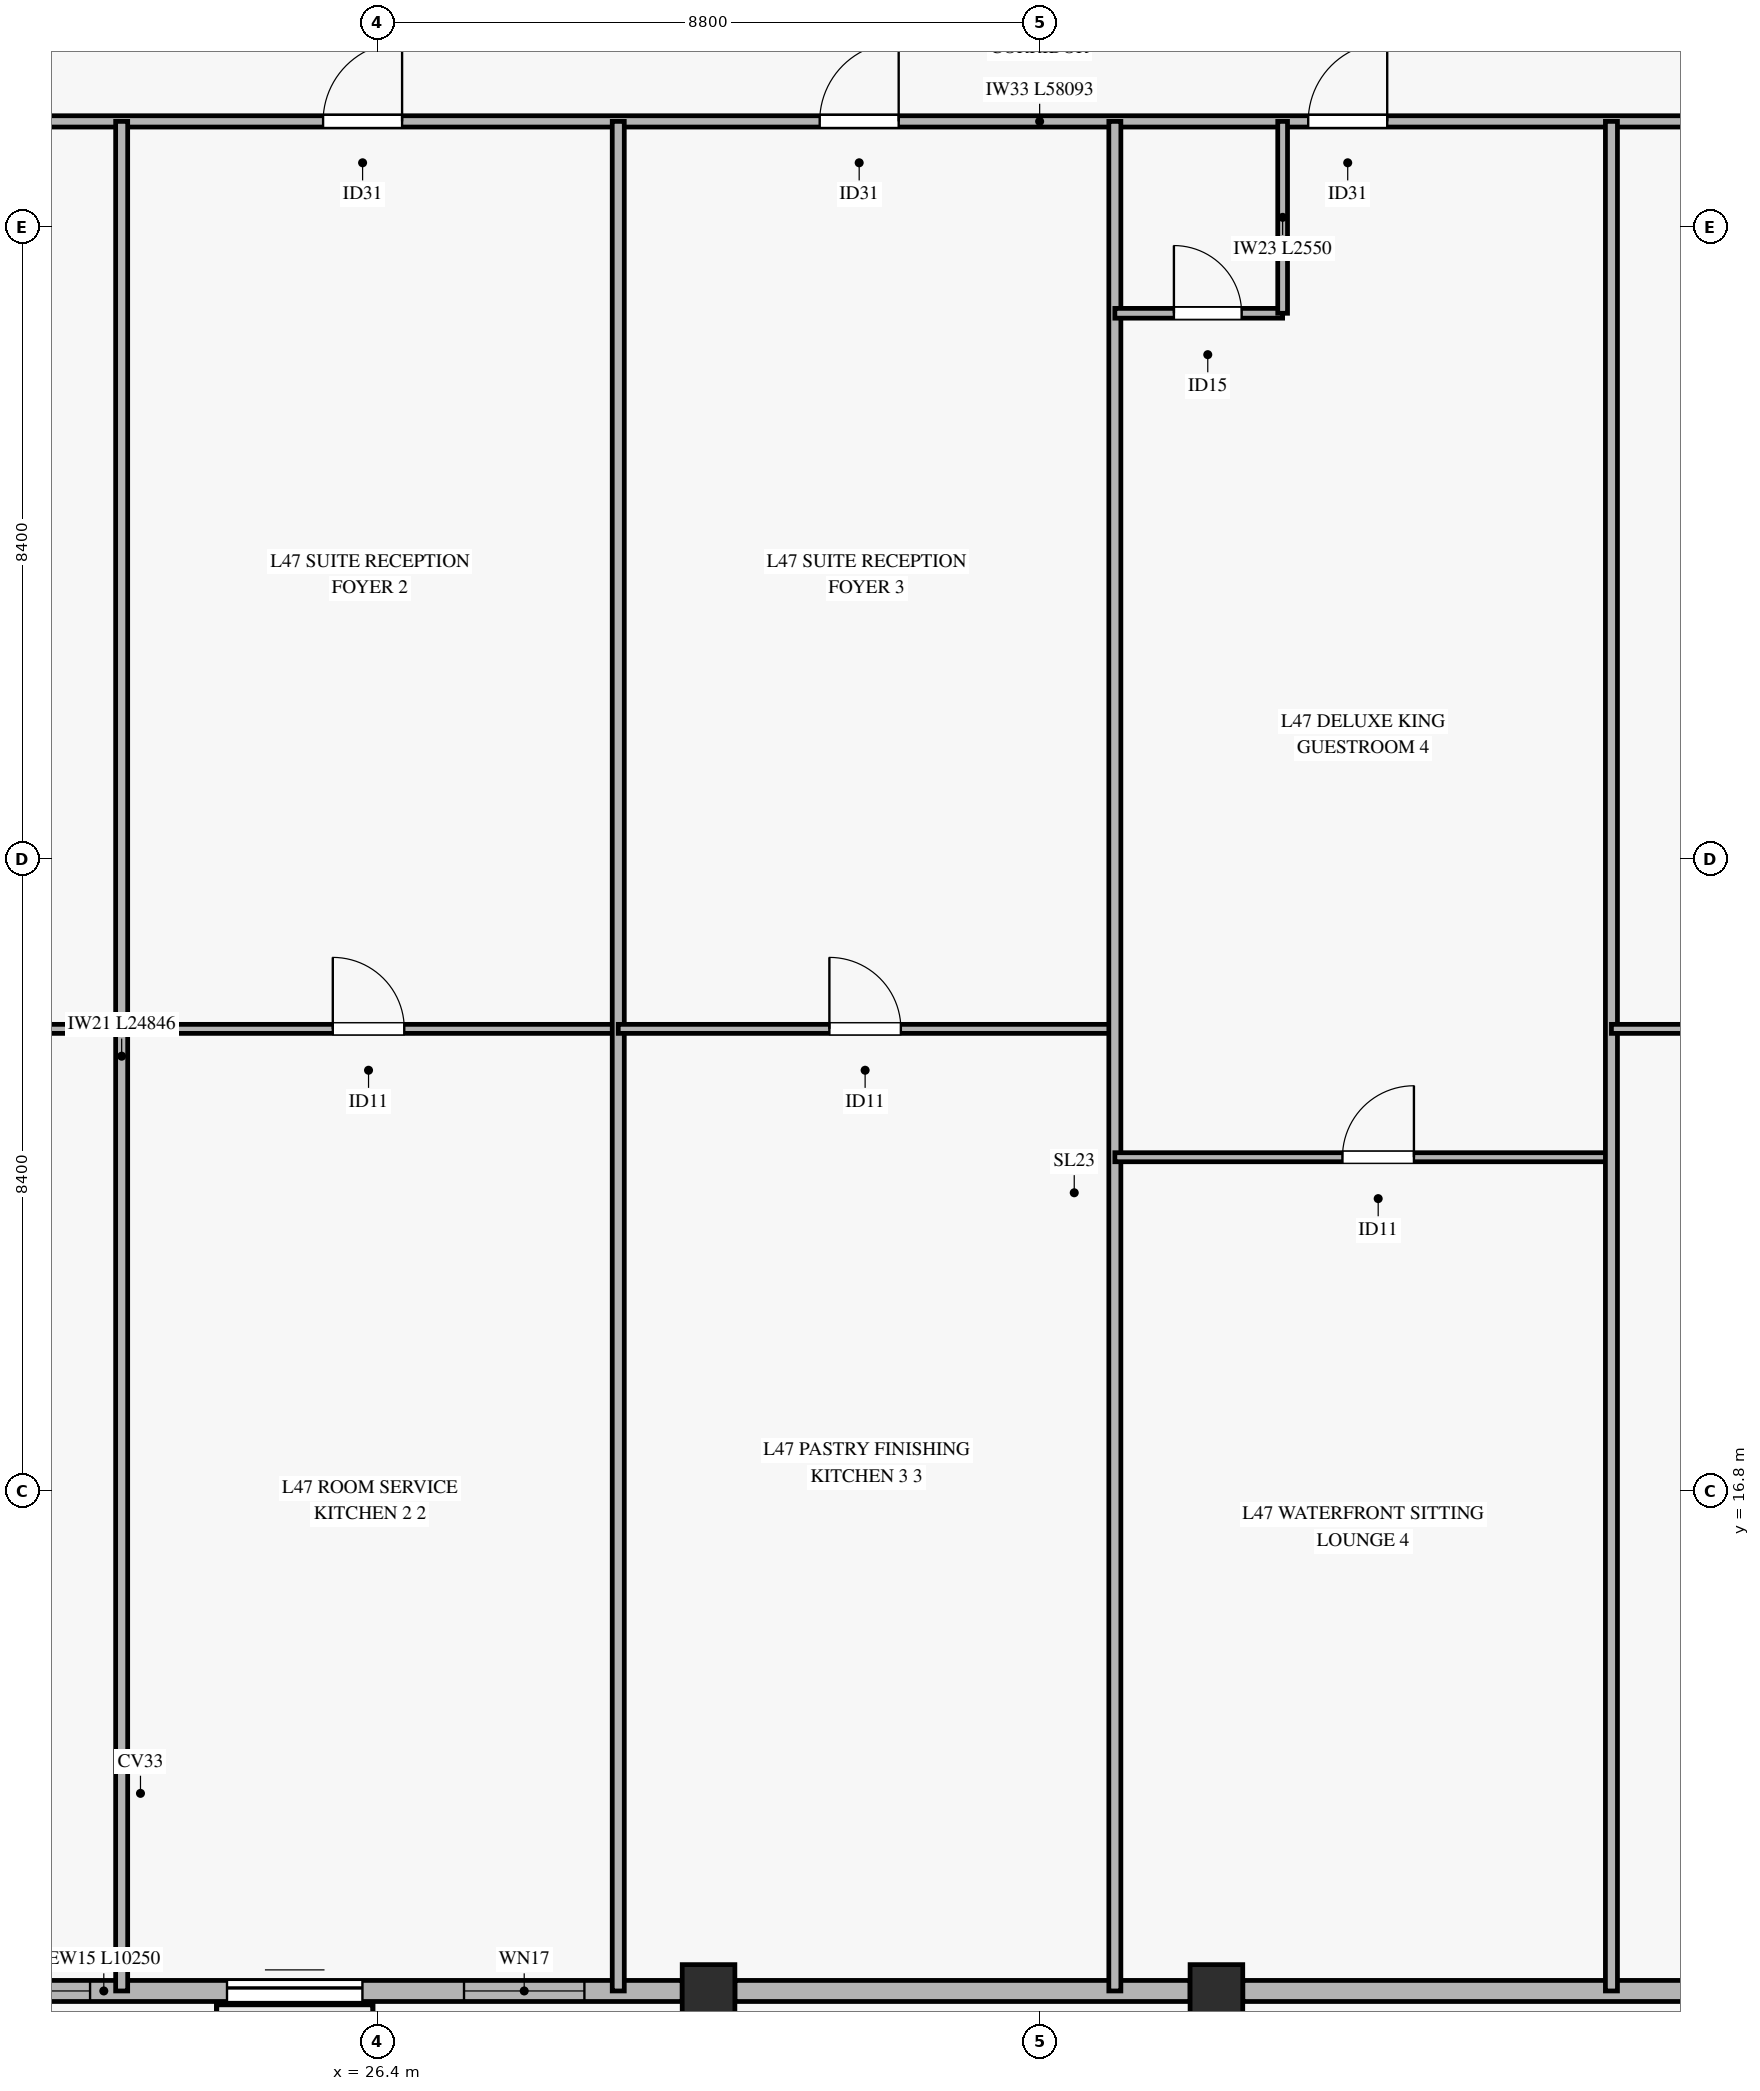
"""IFC4 building model, lengths in metres.
Left out: names, types, materials, properties, quantities, classifications, styles, units other than length and angle.
Written with IfcOpenShell. Run it as: python <this file> out.ifc"""

import sys

from ifc_helpers import new_model, si_unit, direction, frame, frame_2d, origin, origin_2d, place, context, subcontext, project, spatial, rectangle, hollow_rectangle, extrude, source, transform, mapped, element, fill, save


model = new_model("IFC4")
c1 = context("Model", 3, precision=1e-05, world=origin(), true_north=direction((0.0, 1.0)))
c2 = subcontext(c1, "Body", "Model", "MODEL_VIEW")
j1 = project(units=[si_unit("LENGTHUNIT", "METRE"), si_unit("PLANEANGLEUNIT", "RADIAN")], contexts=[c1])
p1 = place(None, origin())
s1 = spatial("IfcSite", under=j1, at=p1, CompositionType="ELEMENT")
p2 = place(p1, origin())
s2 = spatial("IfcBuilding", under=s1, at=p2, CompositionType="ELEMENT")
p3 = place(p2, frame((0.0, 0.0, 187.7)))
s3 = spatial("IfcBuildingStorey", under=s2, at=p3, CompositionType="ELEMENT", Elevation=187.7)
m1 = source(origin(), c2, "Body", "SweptSolid", [
    extrude(hollow_rectangle(XDim=0.7, YDim=0.7, WallThickness=0.032, at=origin_2d()), origin(), (0.0, 0.0, 1.0), 3.263),
])
for number, where, z_axis, x_axis in (
    (1, (30.8, 10.154, 0.0), (0.0, 0.161, 0.987), (-1.0, 0.0, 0.0)),
    (2, (37.55, 10.154, 0.0), (0.0, 0.161, 0.987), (-1.0, 0.0, 0.0)),
):
    element("IfcColumn", number, at=place(p3, frame(where, z_axis=z_axis, x_axis=x_axis)), inside=s3, PredefinedType="COLUMN", context=c2, shape_type="MappedRepresentation", body=[
        mapped(m1, transform((0.0, 0.0, 0.0), x_axis=(1.0, 0.0, 0.0), y_axis=(0.0, 1.0, 0.0), z_axis=(0.0, 0.0, 1.0), scale=1.0)),
    ])
p4 = place(p3, frame((20.2, 10.154, 0.0), z_axis=(0.0, 0.0, 1.0), x_axis=(1.0, 0.0, 0.0)))
e3 = element("IfcWall", 3, at=p4, inside=s3, PredefinedType="SOLIDWALL", context=c2, shape_type="SweptSolid", body=[
    extrude(rectangle(XDim=10.25, YDim=0.28, at=frame_2d((5.125, 0.0))), origin(), (0.0, 0.0, 1.0), 2.7),
])
p5 = place(p4, frame((4.2, 0.0, 0.0)))
e4 = element("IfcOpeningElement", 4, at=p5, cuts=e3, PredefinedType="OPENING", context=c2, shape_type="SweptSolid", body=[
    extrude(rectangle(XDim=1.8, YDim=2.25, at=frame_2d((0.9, 1.125))), frame((0.0, 0.15, 0.0), z_axis=(0.0, -1.0, 0.0), x_axis=(1.0, 0.0, 0.0)), (0.0, 0.0, 1.0), 0.3),
])
p6 = place(p4, frame((0.38, 0.0, 0.35)))
e5 = element("IfcOpeningElement", 5, at=p6, cuts=e3, PredefinedType="OPENING", context=c2, shape_type="SweptSolid", body=[
    extrude(rectangle(XDim=2.0, YDim=2.0, at=frame_2d((1.0, 1.0))), frame((0.0, 0.15, 0.0), z_axis=(0.0, -1.0, 0.0), x_axis=(1.0, 0.0, 0.0)), (0.0, 0.0, 1.0), 0.3),
])
p7 = place(p4, frame((7.35, 0.0, 0.35)))
e6 = element("IfcOpeningElement", 6, at=p7, cuts=e3, PredefinedType="OPENING", context=c2, shape_type="SweptSolid", body=[
    extrude(rectangle(XDim=1.6, YDim=2.0, at=frame_2d((0.8, 1.0))), frame((0.0, 0.15, 0.0), z_axis=(0.0, -1.0, 0.0), x_axis=(1.0, 0.0, 0.0)), (0.0, 0.0, 1.0), 0.3),
])
for number, where, z_axis, x_axis in (
    (7, (31.15, 10.154, 0.0), (0.0, 0.0, 1.0), (1.0, 0.0, 0.0)),
    (8, (37.9, 10.154, 0.0), (0.0, 0.0, 1.0), (1.0, 0.0, 0.0)),
):
    element("IfcWall", number, at=place(p3, frame(where, z_axis=z_axis, x_axis=x_axis)), inside=s3, PredefinedType="SOLIDWALL", context=c2, shape_type="SweptSolid", body=[
        extrude(rectangle(XDim=6.05, YDim=0.28, at=frame_2d((3.025, 0.0))), origin(), (0.0, 0.0, 1.0), 2.7),
    ])
p8 = place(p3, frame((6.154, 35.0, 0.0), z_axis=(0.0, 0.0, 1.0), x_axis=(1.0, 0.0, 0.0)))
e9 = element("IfcWall", 9, at=p8, inside=s3, PredefinedType="PARTITIONING", context=c2, shape_type="SweptSolid", body=[
    extrude(rectangle(XDim=58.093, YDim=0.15, at=frame_2d((29.046, 0.0))), origin(), (0.0, 0.0, 1.0), 2.405),
])
p9 = place(p8, frame((6.84, 0.0, 0.0)))
e10 = element("IfcOpeningElement", 10, at=p9, cuts=e9, PredefinedType="OPENING", context=c2, shape_type="SweptSolid", body=[
    extrude(rectangle(XDim=1.05, YDim=2.15, at=frame_2d((0.525, 1.075))), frame((0.0, 0.085, 0.0), z_axis=(0.0, -1.0, 0.0), x_axis=(1.0, 0.0, 0.0)), (0.0, 0.0, 1.0), 0.17),
])
p10 = place(p8, frame((19.523, 0.0, 0.0)))
e11 = element("IfcOpeningElement", 11, at=p10, cuts=e9, PredefinedType="OPENING", context=c2, shape_type="SweptSolid", body=[
    extrude(rectangle(XDim=1.05, YDim=2.15, at=frame_2d((0.525, 1.075))), frame((0.0, 0.085, 0.0), z_axis=(0.0, -1.0, 0.0), x_axis=(1.0, 0.0, 0.0)), (0.0, 0.0, 1.0), 0.17),
])
p11 = place(p8, frame((26.123, 0.0, 0.0)))
e12 = element("IfcOpeningElement", 12, at=p11, cuts=e9, PredefinedType="OPENING", context=c2, shape_type="SweptSolid", body=[
    extrude(rectangle(XDim=1.05, YDim=2.15, at=frame_2d((0.525, 1.075))), frame((0.0, 0.085, 0.0), z_axis=(0.0, -1.0, 0.0), x_axis=(1.0, 0.0, 0.0)), (0.0, 0.0, 1.0), 0.17),
])
p12 = place(p8, frame((32.616, 0.0, 0.0)))
e13 = element("IfcOpeningElement", 13, at=p12, cuts=e9, PredefinedType="OPENING", context=c2, shape_type="SweptSolid", body=[
    extrude(rectangle(XDim=1.05, YDim=2.15, at=frame_2d((0.525, 1.075))), frame((0.0, 0.085, 0.0), z_axis=(0.0, -1.0, 0.0), x_axis=(1.0, 0.0, 0.0)), (0.0, 0.0, 1.0), 0.17),
])
p13 = place(p8, frame((44.8, 0.0, 0.0)))
e14 = element("IfcOpeningElement", 14, at=p13, cuts=e9, PredefinedType="OPENING", context=c2, shape_type="SweptSolid", body=[
    extrude(rectangle(XDim=1.05, YDim=2.15, at=frame_2d((0.525, 1.075))), frame((0.0, 0.085, 0.0), z_axis=(0.0, -1.0, 0.0), x_axis=(1.0, 0.0, 0.0)), (0.0, 0.0, 1.0), 0.17),
])
p14 = place(p3, frame((6.154, 22.94, 0.0), z_axis=(0.0, 0.0, 1.0), x_axis=(1.0, 0.0, 0.0)))
e15 = element("IfcWall", 15, at=p14, inside=s3, PredefinedType="PARTITIONING", context=c2, shape_type="SweptSolid", body=[
    extrude(rectangle(XDim=16.846, YDim=0.12, at=frame_2d((8.423, 0.0))), origin(), (0.0, 0.0, 1.0), 2.405),
])
p15 = place(p14, frame((7.165, 0.0, 0.0)))
e16 = element("IfcOpeningElement", 16, at=p15, cuts=e15, PredefinedType="OPENING", context=c2, shape_type="SweptSolid", body=[
    extrude(rectangle(XDim=0.95, YDim=2.1, at=frame_2d((0.475, 1.05))), frame((0.0, 0.07, 0.0), z_axis=(0.0, -1.0, 0.0), x_axis=(1.0, 0.0, 0.0)), (0.0, 0.0, 1.0), 0.14),
])
p16 = place(p3, frame((23.0, 10.154, 0.0), z_axis=(0.0, 0.0, 1.0), x_axis=(0.0, 1.0, 0.0)))
e17 = element("IfcWall", 17, at=p16, inside=s3, PredefinedType="PARTITIONING", context=c2, shape_type="SweptSolid", body=[
    extrude(rectangle(XDim=24.846, YDim=0.16, at=frame_2d((12.423, 0.0))), origin(), (0.0, 0.0, 1.0), 2.705),
])
p17 = place(p3, frame((23.0, 22.94, 0.0), z_axis=(0.0, 0.0, 1.0), x_axis=(1.0, 0.0, 0.0)))
e18 = element("IfcWall", 18, at=p17, inside=s3, PredefinedType="PARTITIONING", context=c2, shape_type="SweptSolid", body=[
    extrude(rectangle(XDim=6.6, YDim=0.12, at=frame_2d((3.3, 0.0))), origin(), (0.0, 0.0, 1.0), 3.22),
])
p18 = place(p17, frame((2.806, 0.0, 0.0)))
e19 = element("IfcOpeningElement", 19, at=p18, cuts=e18, PredefinedType="OPENING", context=c2, shape_type="SweptSolid", body=[
    extrude(rectangle(XDim=0.95, YDim=2.1, at=frame_2d((0.475, 1.05))), frame((0.0, 0.07, 0.0), z_axis=(0.0, -1.0, 0.0), x_axis=(1.0, 0.0, 0.0)), (0.0, 0.0, 1.0), 0.14),
])
p19 = place(p3, frame((29.6, 10.154, 0.0), z_axis=(0.0, 0.0, 1.0), x_axis=(0.0, 1.0, 0.0)))
e20 = element("IfcWall", 20, at=p19, inside=s3, PredefinedType="PARTITIONING", context=c2, shape_type="SweptSolid", body=[
    extrude(rectangle(XDim=24.846, YDim=0.16, at=frame_2d((12.423, 0.0))), origin(), (0.0, 0.0, 1.0), 2.705),
])
p20 = place(p3, frame((29.6, 22.94, 0.0), z_axis=(0.0, 0.0, 1.0), x_axis=(1.0, 0.0, 0.0)))
e21 = element("IfcWall", 21, at=p20, inside=s3, PredefinedType="PARTITIONING", context=c2, shape_type="SweptSolid", body=[
    extrude(rectangle(XDim=6.6, YDim=0.12, at=frame_2d((3.3, 0.0))), origin(), (0.0, 0.0, 1.0), 2.405),
])
p21 = place(p20, frame((2.806, 0.0, 0.0)))
e22 = element("IfcOpeningElement", 22, at=p21, cuts=e21, PredefinedType="OPENING", context=c2, shape_type="SweptSolid", body=[
    extrude(rectangle(XDim=0.95, YDim=2.1, at=frame_2d((0.475, 1.05))), frame((0.0, 0.07, 0.0), z_axis=(0.0, -1.0, 0.0), x_axis=(1.0, 0.0, 0.0)), (0.0, 0.0, 1.0), 0.14),
])
p22 = place(p3, frame((36.2, 10.154, 0.0), z_axis=(0.0, 0.0, 1.0), x_axis=(0.0, 1.0, 0.0)))
e23 = element("IfcWall", 23, at=p22, inside=s3, PredefinedType="PARTITIONING", context=c2, shape_type="SweptSolid", body=[
    extrude(rectangle(XDim=24.846, YDim=0.16, at=frame_2d((12.423, 0.0))), origin(), (0.0, 0.0, 1.0), 2.705),
])
p23 = place(p3, frame((36.2, 32.45, 0.0), z_axis=(0.0, 0.0, 1.0), x_axis=(1.0, 0.0, 0.0)))
e24 = element("IfcWall", 24, at=p23, inside=s3, PredefinedType="PARTITIONING", context=c2, shape_type="SweptSolid", body=[
    extrude(rectangle(XDim=2.23, YDim=0.13, at=frame_2d((1.115, 0.0))), origin(), (0.0, 0.0, 1.0), 2.405),
])
p24 = place(p23, frame((0.785, 0.0, 0.0)))
e25 = element("IfcOpeningElement", 25, at=p24, cuts=e24, PredefinedType="OPENING", context=c2, shape_type="SweptSolid", body=[
    extrude(rectangle(XDim=0.9, YDim=2.1, at=frame_2d((0.45, 1.05))), frame((0.0, 0.075, 0.0), z_axis=(0.0, -1.0, 0.0), x_axis=(1.0, 0.0, 0.0)), (0.0, 0.0, 1.0), 0.15),
])
p25 = place(p3, frame((38.43, 32.45, 0.0), z_axis=(0.0, 0.0, 1.0), x_axis=(0.0, 1.0, 0.0)))
e26 = element("IfcWall", 26, at=p25, inside=s3, PredefinedType="PARTITIONING", context=c2, shape_type="SweptSolid", body=[
    extrude(rectangle(XDim=2.55, YDim=0.13, at=frame_2d((1.275, 0.0))), origin(), (0.0, 0.0, 1.0), 2.755),
])
p26 = place(p3, frame((36.2, 21.234, 0.0), z_axis=(0.0, 0.0, 1.0), x_axis=(1.0, 0.0, 0.0)))
e27 = element("IfcWall", 27, at=p26, inside=s3, PredefinedType="PARTITIONING", context=c2, shape_type="SweptSolid", body=[
    extrude(rectangle(XDim=6.6, YDim=0.12, at=frame_2d((3.3, 0.0))), origin(), (0.0, 0.0, 1.0), 2.405),
])
p27 = place(p26, frame((3.025, 0.0, 0.0)))
e28 = element("IfcOpeningElement", 28, at=p27, cuts=e27, PredefinedType="OPENING", context=c2, shape_type="SweptSolid", body=[
    extrude(rectangle(XDim=0.95, YDim=2.1, at=frame_2d((0.475, 1.05))), frame((0.0, 0.07, 0.0), z_axis=(0.0, -1.0, 0.0), x_axis=(1.0, 0.0, 0.0)), (0.0, 0.0, 1.0), 0.14),
])
p28 = place(p3, frame((42.8, 10.154, 0.0), z_axis=(0.0, 0.0, 1.0), x_axis=(0.0, 1.0, 0.0)))
e29 = element("IfcWall", 29, at=p28, inside=s3, PredefinedType="PARTITIONING", context=c2, shape_type="SweptSolid", body=[
    extrude(rectangle(XDim=24.846, YDim=0.16, at=frame_2d((12.423, 0.0))), origin(), (0.0, 0.0, 1.0), 2.705),
])
p29 = place(p3, frame((42.8, 22.94, 0.0), z_axis=(0.0, 0.0, 1.0), x_axis=(1.0, 0.0, 0.0)))
e30 = element("IfcWall", 30, at=p29, inside=s3, PredefinedType="PARTITIONING", context=c2, shape_type="SweptSolid", body=[
    extrude(rectangle(XDim=21.447, YDim=0.12, at=frame_2d((10.724, 0.0))), origin(), (0.0, 0.0, 1.0), 2.405),
])
p30 = place(p29, frame((8.571, 0.0, 0.0)))
e31 = element("IfcOpeningElement", 31, at=p30, cuts=e30, PredefinedType="OPENING", context=c2, shape_type="SweptSolid", body=[
    extrude(rectangle(XDim=0.95, YDim=2.1, at=frame_2d((0.475, 1.05))), frame((0.0, 0.07, 0.0), z_axis=(0.0, -1.0, 0.0), x_axis=(1.0, 0.0, 0.0)), (0.0, 0.0, 1.0), 0.14),
])
m2 = source(origin(), c2, "Body", "SweptSolid", [
    extrude(rectangle(XDim=1.8, YDim=2.25, at=frame_2d((0.9, 1.125))), frame((0.0, 0.025, 0.0), z_axis=(0.0, -1.0, 0.0), x_axis=(1.0, 0.0, 0.0)), (0.0, 0.0, 1.0), 0.05),
])
p31 = place(p5, origin())
e32 = element("IfcDoor", 32, at=p31, inside=s3, OperationType="SLIDING_TO_LEFT", PredefinedType="DOOR", context=c2, shape_type="MappedRepresentation", body=[
    mapped(m2, transform((0.0, 0.0, 0.0), x_axis=(1.0, 0.0, 0.0), y_axis=(0.0, 1.0, 0.0), z_axis=(0.0, 0.0, 1.0), scale=1.0)),
])
fill(e4, e32)
m3 = source(origin(), c2, "Body", "SweptSolid", [
    extrude(rectangle(XDim=2.0, YDim=2.0, at=frame_2d((1.0, 1.0))), frame((0.0, 0.03, 0.0), z_axis=(0.0, -1.0, 0.0), x_axis=(1.0, 0.0, 0.0)), (0.0, 0.0, 1.0), 0.06),
])
p32 = place(p6, origin())
e33 = element("IfcWindow", 33, at=p32, inside=s3, PartitioningType="SINGLE_PANEL", PredefinedType="WINDOW", context=c2, shape_type="MappedRepresentation", body=[
    mapped(m3, transform((0.0, 0.0, 0.0), x_axis=(1.0, 0.0, 0.0), y_axis=(0.0, 1.0, 0.0), z_axis=(0.0, 0.0, 1.0), scale=1.0)),
])
fill(e5, e33)
m4 = source(origin(), c2, "Body", "SweptSolid", [
    extrude(rectangle(XDim=1.6, YDim=2.0, at=frame_2d((0.8, 1.0))), frame((0.0, 0.03, 0.0), z_axis=(0.0, -1.0, 0.0), x_axis=(1.0, 0.0, 0.0)), (0.0, 0.0, 1.0), 0.06),
])
p33 = place(p7, origin())
e34 = element("IfcWindow", 34, at=p33, inside=s3, PartitioningType="SINGLE_PANEL", PredefinedType="WINDOW", context=c2, shape_type="MappedRepresentation", body=[
    mapped(m4, transform((0.0, 0.0, 0.0), x_axis=(1.0, 0.0, 0.0), y_axis=(0.0, 1.0, 0.0), z_axis=(0.0, 0.0, 1.0), scale=1.0)),
])
fill(e6, e34)
m5 = source(origin(), c2, "Body", "SweptSolid", [
    extrude(rectangle(XDim=1.05, YDim=2.15, at=frame_2d((0.525, 1.075))), frame((0.0, 0.025, 0.0), z_axis=(0.0, -1.0, 0.0), x_axis=(1.0, 0.0, 0.0)), (0.0, 0.0, 1.0), 0.05),
])
p34 = place(p10, origin())
e35 = element("IfcDoor", 35, at=p34, inside=s3, OperationType="SINGLE_SWING_RIGHT", PredefinedType="DOOR", context=c2, shape_type="MappedRepresentation", body=[
    mapped(m5, transform((0.0, 0.0, 0.0), x_axis=(1.0, 0.0, 0.0), y_axis=(0.0, 1.0, 0.0), z_axis=(0.0, 0.0, 1.0), scale=1.0)),
])
fill(e11, e35)
m6 = source(origin(), c2, "Body", "SweptSolid", [
    extrude(rectangle(XDim=0.95, YDim=2.1, at=frame_2d((0.475, 1.05))), frame((0.0, 0.025, 0.0), z_axis=(0.0, -1.0, 0.0), x_axis=(1.0, 0.0, 0.0)), (0.0, 0.0, 1.0), 0.05),
])
p35 = place(p18, origin())
e36 = element("IfcDoor", 36, at=p35, inside=s3, OperationType="SINGLE_SWING_LEFT", PredefinedType="DOOR", context=c2, shape_type="MappedRepresentation", body=[
    mapped(m6, transform((0.0, 0.0, 0.0), x_axis=(1.0, 0.0, 0.0), y_axis=(0.0, 1.0, 0.0), z_axis=(0.0, 0.0, 1.0), scale=1.0)),
])
fill(e19, e36)
p36 = place(p11, origin())
e37 = element("IfcDoor", 37, at=p36, inside=s3, OperationType="SINGLE_SWING_RIGHT", PredefinedType="DOOR", context=c2, shape_type="MappedRepresentation", body=[
    mapped(m5, transform((0.0, 0.0, 0.0), x_axis=(1.0, 0.0, 0.0), y_axis=(0.0, 1.0, 0.0), z_axis=(0.0, 0.0, 1.0), scale=1.0)),
])
fill(e12, e37)
p37 = place(p21, origin())
e38 = element("IfcDoor", 38, at=p37, inside=s3, OperationType="SINGLE_SWING_LEFT", PredefinedType="DOOR", context=c2, shape_type="MappedRepresentation", body=[
    mapped(m6, transform((0.0, 0.0, 0.0), x_axis=(1.0, 0.0, 0.0), y_axis=(0.0, 1.0, 0.0), z_axis=(0.0, 0.0, 1.0), scale=1.0)),
])
fill(e22, e38)
p38 = place(p12, origin())
e39 = element("IfcDoor", 39, at=p38, inside=s3, OperationType="SINGLE_SWING_RIGHT", PredefinedType="DOOR", context=c2, shape_type="MappedRepresentation", body=[
    mapped(m5, transform((0.0, 0.0, 0.0), x_axis=(1.0, 0.0, 0.0), y_axis=(0.0, 1.0, 0.0), z_axis=(0.0, 0.0, 1.0), scale=1.0)),
])
fill(e13, e39)
m7 = source(origin(), c2, "Body", "SweptSolid", [
    extrude(rectangle(XDim=0.9, YDim=2.1, at=frame_2d((0.45, 1.05))), frame((0.0, 0.025, 0.0), z_axis=(0.0, -1.0, 0.0), x_axis=(1.0, 0.0, 0.0)), (0.0, 0.0, 1.0), 0.05),
])
p39 = place(p24, origin())
e40 = element("IfcDoor", 40, at=p39, inside=s3, OperationType="SINGLE_SWING_LEFT", PredefinedType="DOOR", context=c2, shape_type="MappedRepresentation", body=[
    mapped(m7, transform((0.0, 0.0, 0.0), x_axis=(1.0, 0.0, 0.0), y_axis=(0.0, 1.0, 0.0), z_axis=(0.0, 0.0, 1.0), scale=1.0)),
])
fill(e25, e40)
p40 = place(p27, origin())
e41 = element("IfcDoor", 41, at=p40, inside=s3, OperationType="SINGLE_SWING_RIGHT", PredefinedType="DOOR", context=c2, shape_type="MappedRepresentation", body=[
    mapped(m6, transform((0.0, 0.0, 0.0), x_axis=(1.0, 0.0, 0.0), y_axis=(0.0, 1.0, 0.0), z_axis=(0.0, 0.0, 1.0), scale=1.0)),
])
fill(e28, e41)
save(model, sys.argv[1])
